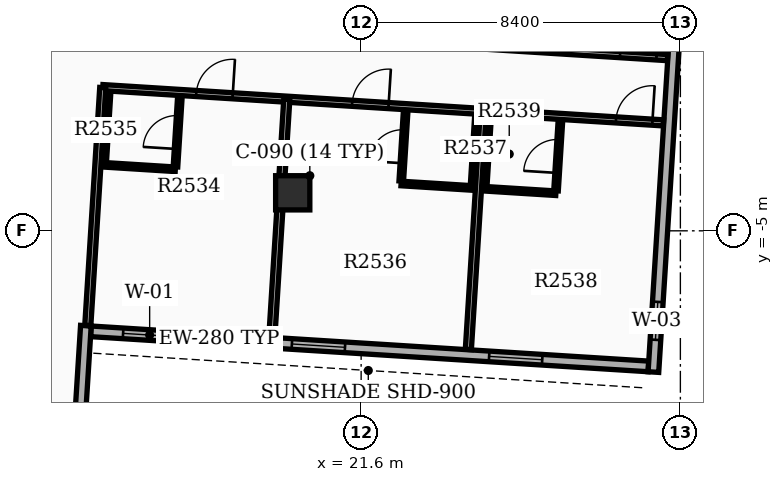
"""IFC4 building model, lengths in metres.
Left out: names, types, materials, properties, quantities, classifications, styles, units other than length and angle.
Written with IfcOpenShell. Run it as: python <this file> out.ifc"""

import sys

from ifc_helpers import new_model, si_unit, direction, frame, frame_2d, origin, origin_2d, place, context, subcontext, project, spatial, rectangle, extrude, element, fill, save


model = new_model("IFC4")
c1 = context("Model", 3, precision=1e-05, world=origin(), true_north=direction((0.0, 1.0)))
c2 = subcontext(c1, "Body", "Model", "MODEL_VIEW")
j1 = project(units=[si_unit("LENGTHUNIT", "METRE"), si_unit("PLANEANGLEUNIT", "RADIAN")], contexts=[c1])
p1 = place(None, origin())
s1 = spatial("IfcSite", under=j1, at=p1, CompositionType="ELEMENT")
p2 = place(p1, origin())
s2 = spatial("IfcBuilding", under=s1, at=p2, CompositionType="ELEMENT")
p3 = place(p2, frame((0.0, 0.0, 160.5)))
s3 = spatial("IfcBuildingStorey", under=s2, at=p3, CompositionType="ELEMENT", Elevation=160.5)
p4 = place(p3, frame((19.8, -4.0, 0.0), z_axis=(0.0, 0.0, 1.0), x_axis=(1.0, 0.0, 0.0)))
e1 = element("IfcColumn", 1, at=p4, inside=s3, PredefinedType="COLUMN", context=c2, shape_type="SweptSolid", body=[
    extrude(rectangle(XDim=0.9, YDim=0.9, at=origin_2d()), origin(), (0.0, 0.0, 1.0), 3.9),
])
p5 = place(p3, frame((14.489, -7.645, 0.0), z_axis=(0.0, 0.0, 1.0), x_axis=(0.998026448555, -0.062794967833, 0.0)))
e2 = element("IfcWall", 2, at=p5, inside=s3, PredefinedType="STANDARD", context=c2, shape_type="SweptSolid", body=[
    extrude(rectangle(XDim=14.7, YDim=0.28, at=frame_2d((7.35, 0.0))), origin(), (0.0, 0.0, 1.0), 2.97),
])
p6 = place(p5, frame((0.85, 0.0, 0.8)))
e3 = element("IfcOpeningElement", 3, at=p6, cuts=e2, PredefinedType="OPENING", context=c2, shape_type="SweptSolid", body=[
    extrude(rectangle(XDim=1.4, YDim=1.6, at=frame_2d((0.7, 0.8))), frame((0.0, 0.15, 0.0), z_axis=(0.0, -1.0, 0.0), x_axis=(1.0, 0.0, 0.0)), (0.0, 0.0, 1.0), 0.3),
])
p7 = place(p5, frame((5.3, 0.0, 0.8)))
e4 = element("IfcOpeningElement", 4, at=p7, cuts=e2, PredefinedType="OPENING", context=c2, shape_type="SweptSolid", body=[
    extrude(rectangle(XDim=1.4, YDim=1.6, at=frame_2d((0.7, 0.8))), frame((0.0, 0.15, 0.0), z_axis=(0.0, -1.0, 0.0), x_axis=(1.0, 0.0, 0.0)), (0.0, 0.0, 1.0), 0.3),
])
p8 = place(p5, frame((10.5, 0.0, 0.8)))
e5 = element("IfcOpeningElement", 5, at=p8, cuts=e2, PredefinedType="OPENING", context=c2, shape_type="SweptSolid", body=[
    extrude(rectangle(XDim=1.4, YDim=1.6, at=frame_2d((0.7, 0.8))), frame((0.0, 0.15, 0.0), z_axis=(0.0, -1.0, 0.0), x_axis=(1.0, 0.0, 0.0)), (0.0, 0.0, 1.0), 0.3),
])
p9 = place(p3, frame((29.291, -8.716, 0.0), z_axis=(0.0, 0.0, 1.0), x_axis=(0.062797041623, 0.998026318072, 0.0)))
e6 = element("IfcWall", 6, at=p9, inside=s3, PredefinedType="STANDARD", context=c2, shape_type="SweptSolid", body=[
    extrude(rectangle(XDim=13.72, YDim=0.28, at=frame_2d((6.86, 0.0))), origin(), (0.0, 0.0, 1.0), 2.97),
])
p10 = place(p9, frame((0.85, 0.0, 0.85)))
e7 = element("IfcOpeningElement", 7, at=p10, cuts=e6, PredefinedType="OPENING", context=c2, shape_type="SweptSolid", body=[
    extrude(rectangle(XDim=1.0, YDim=1.5, at=frame_2d((0.5, 0.75))), frame((0.0, 0.15, 0.0), z_axis=(0.0, -1.0, 0.0), x_axis=(1.0, 0.0, 0.0)), (0.0, 0.0, 1.0), 0.3),
])
p11 = place(p3, frame((14.358, -7.496, 0.0), z_axis=(0.0, 0.0, 1.0), x_axis=(-0.062779317195, -0.998027433156, 0.0)))
e8 = element("IfcWall", 8, at=p11, inside=s3, PredefinedType="STANDARD", context=c2, shape_type="SweptSolid", body=[
    extrude(rectangle(XDim=6.86, YDim=0.28, at=frame_2d((3.43, 0.0))), origin(), (0.0, 0.0, 1.0), 2.97),
])
p12 = place(p3, frame((14.91, 0.485, 0.0), z_axis=(0.0, 0.0, 1.0), x_axis=(0.998026464074, -0.062794721174, 0.0)))
e9 = element("IfcWall", 9, at=p12, inside=s3, PredefinedType="PARTITIONING", context=c2, shape_type="SweptSolid", body=[
    extrude(rectangle(XDim=14.782, YDim=0.16, at=frame_2d((7.391, 0.0))), origin(), (0.0, 0.0, 1.0), 2.96),
])
p13 = place(p12, frame((2.465, 0.0, 0.0)))
e10 = element("IfcOpeningElement", 10, at=p13, cuts=e9, PredefinedType="OPENING", context=c2, shape_type="SweptSolid", body=[
    extrude(rectangle(XDim=0.96, YDim=2.15, at=frame_2d((0.48, 1.075))), frame((0.0, 0.09, 0.0), z_axis=(0.0, -1.0, 0.0), x_axis=(1.0, 0.0, 0.0)), (0.0, 0.0, 1.0), 0.18),
])
p14 = place(p12, frame((8.773, 0.0, 0.0)))
e11 = element("IfcOpeningElement", 11, at=p14, cuts=e9, PredefinedType="OPENING", context=c2, shape_type="SweptSolid", body=[
    extrude(rectangle(XDim=0.96, YDim=2.15, at=frame_2d((0.48, 1.075))), frame((0.0, 0.09, 0.0), z_axis=(0.0, -1.0, 0.0), x_axis=(1.0, 0.0, 0.0)), (0.0, 0.0, 1.0), 0.18),
])
p15 = place(p12, frame((13.53, 0.0, 0.0)))
e12 = element("IfcOpeningElement", 12, at=p15, cuts=e9, PredefinedType="OPENING", context=c2, shape_type="SweptSolid", body=[
    extrude(rectangle(XDim=0.96, YDim=2.15, at=frame_2d((0.48, 1.075))), frame((0.0, 0.09, 0.0), z_axis=(0.0, -1.0, 0.0), x_axis=(1.0, 0.0, 0.0)), (0.0, 0.0, 1.0), 0.18),
])
p16 = place(p3, frame((14.802, -1.232, 0.0), z_axis=(0.0, 0.0, 1.0), x_axis=(0.998026464074, -0.062794721174, 0.0)))
e13 = element("IfcWall", 13, at=p16, inside=s3, PredefinedType="PARTITIONING", context=c2, shape_type="SweptSolid", body=[
    extrude(rectangle(XDim=14.782, YDim=0.16, at=frame_2d((7.391, 0.0))), origin(), (0.0, 0.0, 1.0), 2.96),
])
p17 = place(p16, frame((2.465, 0.0, 0.0)))
e14 = element("IfcOpeningElement", 14, at=p17, cuts=e13, PredefinedType="OPENING", context=c2, shape_type="SweptSolid", body=[
    extrude(rectangle(XDim=0.96, YDim=2.15, at=frame_2d((0.48, 1.075))), frame((0.0, 0.09, 0.0), z_axis=(0.0, -1.0, 0.0), x_axis=(1.0, 0.0, 0.0)), (0.0, 0.0, 1.0), 0.18),
])
p18 = place(p16, frame((6.575, 0.0, 0.0)))
e15 = element("IfcOpeningElement", 15, at=p18, cuts=e13, PredefinedType="OPENING", context=c2, shape_type="SweptSolid", body=[
    extrude(rectangle(XDim=0.96, YDim=2.15, at=frame_2d((0.48, 1.075))), frame((0.0, 0.09, 0.0), z_axis=(0.0, -1.0, 0.0), x_axis=(1.0, 0.0, 0.0)), (0.0, 0.0, 1.0), 0.18),
])
p19 = place(p16, frame((13.53, 0.0, 0.0)))
e16 = element("IfcOpeningElement", 16, at=p19, cuts=e13, PredefinedType="OPENING", context=c2, shape_type="SweptSolid", body=[
    extrude(rectangle(XDim=0.96, YDim=2.15, at=frame_2d((0.48, 1.075))), frame((0.0, 0.09, 0.0), z_axis=(0.0, -1.0, 0.0), x_axis=(1.0, 0.0, 0.0)), (0.0, 0.0, 1.0), 0.18),
])
p20 = place(p3, frame((14.802, -1.232, 0.0), z_axis=(0.0, 0.0, 1.0), x_axis=(-0.062824170115, -0.998024610743, 0.0)))
e17 = element("IfcWall", 17, at=p20, inside=s3, PredefinedType="PARTITIONING", context=c2, shape_type="SweptSolid", body=[
    extrude(rectangle(XDim=6.272, YDim=0.16, at=frame_2d((3.136, 0.0))), origin(), (0.0, 0.0, 1.0), 2.96),
])
p21 = place(p3, frame((19.644, -1.537, 0.0), z_axis=(0.0, 0.0, 1.0), x_axis=(-0.062787838256, -0.998026897116, 0.0)))
e18 = element("IfcWall", 18, at=p21, inside=s3, PredefinedType="PARTITIONING", context=c2, shape_type="SweptSolid", body=[
    extrude(rectangle(XDim=6.272, YDim=0.16, at=frame_2d((3.136, 0.0))), origin(), (0.0, 0.0, 1.0), 2.96),
])
p22 = place(p3, frame((16.715, -3.316, 0.0), z_axis=(0.0, 0.0, 1.0), x_axis=(0.062779145668, 0.998027443946, 0.0)))
e19 = element("IfcWall", 19, at=p22, inside=s3, PredefinedType="PARTITIONING", context=c2, shape_type="SweptSolid", body=[
    extrude(rectangle(XDim=1.82, YDim=0.12, at=frame_2d((0.91, 0.0))), origin(), (0.0, 0.0, 1.0), 2.96),
])
p23 = place(p22, frame((0.47, 0.0, 0.0)))
e20 = element("IfcOpeningElement", 20, at=p23, cuts=e19, PredefinedType="OPENING", context=c2, shape_type="SweptSolid", body=[
    extrude(rectangle(XDim=0.88, YDim=2.1, at=frame_2d((0.44, 1.05))), frame((0.0, 0.07, 0.0), z_axis=(0.0, -1.0, 0.0), x_axis=(1.0, 0.0, 0.0)), (0.0, 0.0, 1.0), 0.14),
])
p24 = place(p3, frame((14.838, -3.198, 0.0), z_axis=(0.0, 0.0, 1.0), x_axis=(0.062912758763, 0.998019030272, 0.0)))
e21 = element("IfcWall", 21, at=p24, inside=s3, PredefinedType="PARTITIONING", context=c2, shape_type="SweptSolid", body=[
    extrude(rectangle(XDim=1.82, YDim=0.12, at=frame_2d((0.91, 0.0))), origin(), (0.0, 0.0, 1.0), 2.96),
])
p25 = place(p3, frame((14.834, -3.263, 0.0), z_axis=(0.0, 0.0, 1.0), x_axis=(0.998030789148, -0.062725942896, 0.0)))
e22 = element("IfcWall", 22, at=p25, inside=s3, PredefinedType="PARTITIONING", context=c2, shape_type="SweptSolid", body=[
    extrude(rectangle(XDim=1.88, YDim=0.12, at=frame_2d((0.94, 0.0))), origin(), (0.0, 0.0, 1.0), 2.96),
])
p26 = place(p3, frame((24.815, -1.862, 0.0), z_axis=(0.0, 0.0, 1.0), x_axis=(-0.062824170115, -0.998024610743, 0.0)))
e23 = element("IfcWall", 23, at=p26, inside=s3, PredefinedType="PARTITIONING", context=c2, shape_type="SweptSolid", body=[
    extrude(rectangle(XDim=6.272, YDim=0.16, at=frame_2d((3.136, 0.0))), origin(), (0.0, 0.0, 1.0), 2.96),
])
p27 = place(p3, frame((22.656, -3.69, 0.0), z_axis=(0.0, 0.0, 1.0), x_axis=(0.062779145668, 0.998027443946, 0.0)))
e24 = element("IfcWall", 24, at=p27, inside=s3, PredefinedType="PARTITIONING", context=c2, shape_type="SweptSolid", body=[
    extrude(rectangle(XDim=1.82, YDim=0.12, at=frame_2d((0.91, 0.0))), origin(), (0.0, 0.0, 1.0), 2.96),
])
p28 = place(p27, frame((0.47, 0.0, 0.0)))
e25 = element("IfcOpeningElement", 25, at=p28, cuts=e24, PredefinedType="OPENING", context=c2, shape_type="SweptSolid", body=[
    extrude(rectangle(XDim=0.88, YDim=2.1, at=frame_2d((0.44, 1.05))), frame((0.0, 0.07, 0.0), z_axis=(0.0, -1.0, 0.0), x_axis=(1.0, 0.0, 0.0)), (0.0, 0.0, 1.0), 0.14),
])
p29 = place(p3, frame((24.532, -3.808, 0.0), z_axis=(0.0, 0.0, 1.0), x_axis=(0.062779145668, 0.998027443946, 0.0)))
e26 = element("IfcWall", 26, at=p29, inside=s3, PredefinedType="PARTITIONING", context=c2, shape_type="SweptSolid", body=[
    extrude(rectangle(XDim=1.82, YDim=0.12, at=frame_2d((0.91, 0.0))), origin(), (0.0, 0.0, 1.0), 2.96),
])
p30 = place(p3, frame((22.652, -3.755, 0.0), z_axis=(0.0, 0.0, 1.0), x_axis=(0.998023163794, -0.062847152131, 0.0)))
e27 = element("IfcWall", 27, at=p30, inside=s3, PredefinedType="PARTITIONING", context=c2, shape_type="SweptSolid", body=[
    extrude(rectangle(XDim=1.88, YDim=0.12, at=frame_2d((0.94, 0.0))), origin(), (0.0, 0.0, 1.0), 2.96),
])
p31 = place(p3, frame((26.728, -3.946, 0.0), z_axis=(0.0, 0.0, 1.0), x_axis=(0.062779145668, 0.998027443946, 0.0)))
e28 = element("IfcWall", 28, at=p31, inside=s3, PredefinedType="PARTITIONING", context=c2, shape_type="SweptSolid", body=[
    extrude(rectangle(XDim=1.82, YDim=0.12, at=frame_2d((0.91, 0.0))), origin(), (0.0, 0.0, 1.0), 2.96),
])
p32 = place(p31, frame((0.47, 0.0, 0.0)))
e29 = element("IfcOpeningElement", 29, at=p32, cuts=e28, PredefinedType="OPENING", context=c2, shape_type="SweptSolid", body=[
    extrude(rectangle(XDim=0.88, YDim=2.1, at=frame_2d((0.44, 1.05))), frame((0.0, 0.07, 0.0), z_axis=(0.0, -1.0, 0.0), x_axis=(1.0, 0.0, 0.0)), (0.0, 0.0, 1.0), 0.14),
])
p33 = place(p3, frame((24.852, -3.828, 0.0), z_axis=(0.0, 0.0, 1.0), x_axis=(0.062787551592, 0.998026915151, 0.0)))
e30 = element("IfcWall", 30, at=p33, inside=s3, PredefinedType="PARTITIONING", context=c2, shape_type="SweptSolid", body=[
    extrude(rectangle(XDim=1.82, YDim=0.12, at=frame_2d((0.91, 0.0))), origin(), (0.0, 0.0, 1.0), 2.96),
])
p34 = place(p3, frame((24.848, -3.893, 0.0), z_axis=(0.0, 0.0, 1.0), x_axis=(0.998022650819, -0.062855297722, 0.0)))
e31 = element("IfcWall", 31, at=p34, inside=s3, PredefinedType="PARTITIONING", context=c2, shape_type="SweptSolid", body=[
    extrude(rectangle(XDim=1.88, YDim=0.12, at=frame_2d((0.94, 0.0))), origin(), (0.0, 0.0, 1.0), 2.96),
])
p35 = place(p6, origin())
e32 = element("IfcWindow", 32, at=p35, inside=s3, PartitioningType="SINGLE_PANEL", PredefinedType="WINDOW", context=c2, shape_type="SweptSolid", body=[
    extrude(rectangle(XDim=1.4, YDim=1.6, at=frame_2d((0.7, 0.8))), frame((0.0, 0.03, 0.0), z_axis=(0.0, -1.0, 0.0), x_axis=(1.0, 0.0, 0.0)), (0.0, 0.0, 1.0), 0.06),
])
fill(e3, e32)
p36 = place(p7, origin())
e33 = element("IfcWindow", 33, at=p36, inside=s3, PartitioningType="SINGLE_PANEL", PredefinedType="WINDOW", context=c2, shape_type="SweptSolid", body=[
    extrude(rectangle(XDim=1.4, YDim=1.6, at=frame_2d((0.7, 0.8))), frame((0.0, 0.03, 0.0), z_axis=(0.0, -1.0, 0.0), x_axis=(1.0, 0.0, 0.0)), (0.0, 0.0, 1.0), 0.06),
])
fill(e4, e33)
p37 = place(p8, origin())
e34 = element("IfcWindow", 34, at=p37, inside=s3, PartitioningType="SINGLE_PANEL", PredefinedType="WINDOW", context=c2, shape_type="SweptSolid", body=[
    extrude(rectangle(XDim=1.4, YDim=1.6, at=frame_2d((0.7, 0.8))), frame((0.0, 0.03, 0.0), z_axis=(0.0, -1.0, 0.0), x_axis=(1.0, 0.0, 0.0)), (0.0, 0.0, 1.0), 0.06),
])
fill(e5, e34)
p38 = place(p10, origin())
e35 = element("IfcWindow", 35, at=p38, inside=s3, PartitioningType="SINGLE_PANEL", PredefinedType="WINDOW", context=c2, shape_type="SweptSolid", body=[
    extrude(rectangle(XDim=1.0, YDim=1.5, at=frame_2d((0.5, 0.75))), frame((0.0, 0.03, 0.0), z_axis=(0.0, -1.0, 0.0), x_axis=(1.0, 0.0, 0.0)), (0.0, 0.0, 1.0), 0.06),
])
fill(e7, e35)
p39 = place(p15, origin())
e36 = element("IfcDoor", 36, at=p39, inside=s3, OperationType="SINGLE_SWING_RIGHT", PredefinedType="DOOR", context=c2, shape_type="SweptSolid", body=[
    extrude(rectangle(XDim=0.96, YDim=2.15, at=frame_2d((0.48, 1.075))), frame((0.0, 0.025, 0.0), z_axis=(0.0, -1.0, 0.0), x_axis=(1.0, 0.0, 0.0)), (0.0, 0.0, 1.0), 0.05),
])
fill(e12, e36)
p40 = place(p17, origin())
e37 = element("IfcDoor", 37, at=p40, inside=s3, OperationType="SINGLE_SWING_RIGHT", PredefinedType="DOOR", context=c2, shape_type="SweptSolid", body=[
    extrude(rectangle(XDim=0.96, YDim=2.15, at=frame_2d((0.48, 1.075))), frame((0.0, 0.025, 0.0), z_axis=(0.0, -1.0, 0.0), x_axis=(1.0, 0.0, 0.0)), (0.0, 0.0, 1.0), 0.05),
])
fill(e14, e37)
p41 = place(p23, origin())
e38 = element("IfcDoor", 38, at=p41, inside=s3, OperationType="SINGLE_SWING_LEFT", PredefinedType="DOOR", context=c2, shape_type="SweptSolid", body=[
    extrude(rectangle(XDim=0.88, YDim=2.1, at=frame_2d((0.44, 1.05))), frame((0.0, 0.025, 0.0), z_axis=(0.0, -1.0, 0.0), x_axis=(1.0, 0.0, 0.0)), (0.0, 0.0, 1.0), 0.05),
])
fill(e20, e38)
p42 = place(p18, origin())
e39 = element("IfcDoor", 39, at=p42, inside=s3, OperationType="SINGLE_SWING_RIGHT", PredefinedType="DOOR", context=c2, shape_type="SweptSolid", body=[
    extrude(rectangle(XDim=0.96, YDim=2.15, at=frame_2d((0.48, 1.075))), frame((0.0, 0.025, 0.0), z_axis=(0.0, -1.0, 0.0), x_axis=(1.0, 0.0, 0.0)), (0.0, 0.0, 1.0), 0.05),
])
fill(e15, e39)
p43 = place(p28, origin())
e40 = element("IfcDoor", 40, at=p43, inside=s3, OperationType="SINGLE_SWING_LEFT", PredefinedType="DOOR", context=c2, shape_type="SweptSolid", body=[
    extrude(rectangle(XDim=0.88, YDim=2.1, at=frame_2d((0.44, 1.05))), frame((0.0, 0.025, 0.0), z_axis=(0.0, -1.0, 0.0), x_axis=(1.0, 0.0, 0.0)), (0.0, 0.0, 1.0), 0.05),
])
fill(e25, e40)
p44 = place(p19, origin())
e41 = element("IfcDoor", 41, at=p44, inside=s3, OperationType="SINGLE_SWING_RIGHT", PredefinedType="DOOR", context=c2, shape_type="SweptSolid", body=[
    extrude(rectangle(XDim=0.96, YDim=2.15, at=frame_2d((0.48, 1.075))), frame((0.0, 0.025, 0.0), z_axis=(0.0, -1.0, 0.0), x_axis=(1.0, 0.0, 0.0)), (0.0, 0.0, 1.0), 0.05),
])
fill(e16, e41)
p45 = place(p32, origin())
e42 = element("IfcDoor", 42, at=p45, inside=s3, OperationType="SINGLE_SWING_LEFT", PredefinedType="DOOR", context=c2, shape_type="SweptSolid", body=[
    extrude(rectangle(XDim=0.88, YDim=2.1, at=frame_2d((0.44, 1.05))), frame((0.0, 0.025, 0.0), z_axis=(0.0, -1.0, 0.0), x_axis=(1.0, 0.0, 0.0)), (0.0, 0.0, 1.0), 0.05),
])
fill(e29, e42)
save(model, sys.argv[1])
